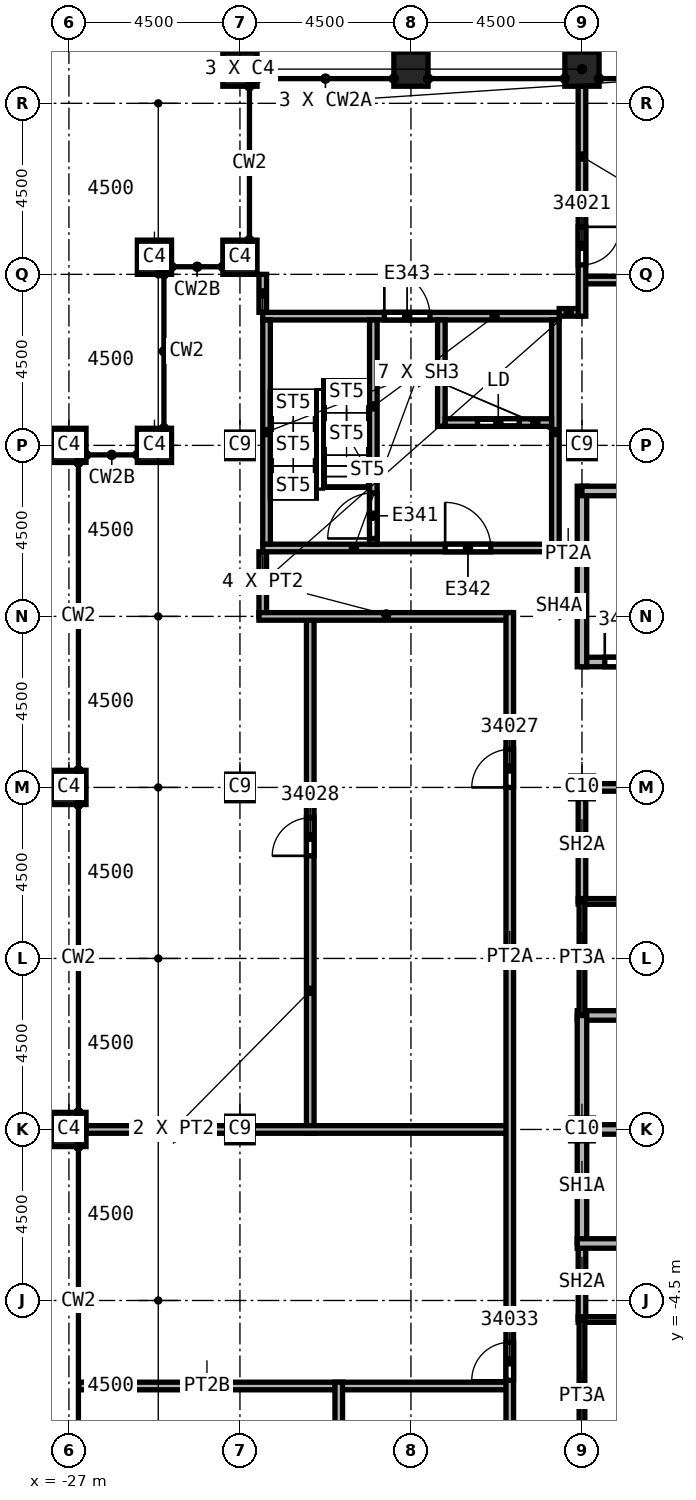
"""IFC4 building model, lengths in metres.
Left out: names, types, materials, properties, quantities, classifications, styles, units other than length and angle.
Written with IfcOpenShell. Run it as: python <this file> out.ifc"""

import sys

from ifc_helpers import new_model, si_unit, direction, frame, frame_2d, origin, origin_2d, place, context, subcontext, project, spatial, rectangle, extrude, element, fill, save


model = new_model("IFC4")
c1 = context("Model", 3, precision=1e-05, world=origin(), true_north=direction((0.0, 1.0)))
c2 = subcontext(c1, "Body", "Model", "MODEL_VIEW")
j1 = project(units=[si_unit("LENGTHUNIT", "METRE"), si_unit("PLANEANGLEUNIT", "RADIAN")], contexts=[c1])
p1 = place(None, origin())
s1 = spatial("IfcSite", under=j1, at=p1, CompositionType="ELEMENT")
p2 = place(p1, origin())
s2 = spatial("IfcBuilding", under=s1, at=p2, CompositionType="ELEMENT")
p3 = place(p2, frame((0.0, 0.0, 366.0)))
s3 = spatial("IfcBuildingStorey", under=s2, at=p3, CompositionType="ELEMENT", Elevation=366.0)
for number, where, z_axis, x_axis in (
    (1, (-13.5, 18.0, 0.0), (0.0, 0.0, 1.0), (1.0, 0.0, 0.0)),
    (2, (-22.5, 0.0, 0.0), (0.0, 0.0, 1.0), (1.0, 0.0, 0.0)),
    (3, (-22.5, 9.0, 0.0), (0.0, 0.0, 1.0), (1.0, 0.0, 0.0)),
    (4, (-22.5, 18.0, 0.0), (0.0, 0.0, 1.0), (1.0, 0.0, 0.0)),
):
    element("IfcColumn", number, at=place(p3, frame(where, z_axis=z_axis, x_axis=x_axis)), inside=s3, PredefinedType="COLUMN", context=c2, shape_type="SweptSolid", body=[
        extrude(rectangle(XDim=0.7, YDim=0.7, at=origin_2d()), origin(), (0.0, 0.0, 1.0), 9.6),
    ])
for number, where, z_axis, x_axis in (
    (5, (-13.5, 0.0, 0.0), (0.0, 0.0, 1.0), (1.0, 0.0, 0.0)),
    (6, (-13.5, 9.0, 0.0), (0.0, 0.0, 1.0), (1.0, 0.0, 0.0)),
):
    element("IfcColumn", number, at=place(p3, frame(where, z_axis=z_axis, x_axis=x_axis)), inside=s3, PredefinedType="COLUMN", context=c2, shape_type="SweptSolid", body=[
        extrude(rectangle(XDim=0.6, YDim=0.6, at=origin_2d()), origin(), (0.0, 0.0, 1.0), 9.6),
    ])
for number, where, z_axis, x_axis in (
    (7, (-13.5, 27.9, 0.0), (0.0, 0.0, 1.0), (1.0, 0.0, 0.0)),
    (8, (-18.0, 27.9, 0.0), (0.0, 0.0, 1.0), (1.0, 0.0, 0.0)),
    (9, (-22.5, 27.9, 0.0), (0.0, 0.0, 1.0), (1.0, 0.0, 0.0)),
    (10, (-27.0, 0.0, 0.0), (0.0, 0.0, 1.0), (0.0, 1.0, 0.0)),
    (11, (-27.0, 9.0, 0.0), (0.0, 0.0, 1.0), (0.0, 1.0, 0.0)),
    (12, (-27.0, 18.0, 0.0), (0.0, 0.0, 1.0), (0.0, 1.0, 0.0)),
    (13, (-22.5, 22.95, 0.0), (0.0, 0.0, 1.0), (1.0, 0.0, 0.0)),
    (14, (-24.75, 22.95, 0.0), (0.0, 0.0, 1.0), (1.0, 0.0, 0.0)),
    (15, (-24.75, 18.0, 0.0), (0.0, 0.0, 1.0), (1.0, 0.0, 0.0)),
):
    element("IfcColumn", number, at=place(p3, frame(where, z_axis=z_axis, x_axis=x_axis)), inside=s3, PredefinedType="COLUMN", context=c2, shape_type="SweptSolid", body=[
        extrude(rectangle(XDim=0.9, YDim=0.9, at=origin_2d()), origin(), (0.0, 0.0, 1.0), 9.6),
    ])
p4 = place(p3, frame((-26.736, -6.75, 0.0), z_axis=(0.0, 0.0, 1.0), x_axis=(1.0, 0.0, 0.0)))
e16 = element("IfcWall", 16, at=p4, inside=s3, PredefinedType="PARTITIONING", context=c2, shape_type="SweptSolid", body=[
    extrude(rectangle(XDim=11.336, YDim=0.2, at=frame_2d((5.668, 0.0))), origin(), (0.0, 0.0, 1.0), 9.115),
])
p5 = place(p3, frame((-21.9, 13.5, 0.0), z_axis=(0.0, 0.0, 1.0), x_axis=(0.0, 1.0, 0.0)))
e17 = element("IfcWall", 17, at=p5, inside=s3, PredefinedType="PARTITIONING", context=c2, shape_type="SweptSolid", body=[
    extrude(rectangle(XDim=1.7, YDim=0.2, at=frame_2d((0.85, 0.0))), origin(), (0.0, 0.0, 1.0), 9.15),
])
p6 = place(p3, frame((-21.9, 21.5, 0.0), z_axis=(0.0, 0.0, 1.0), x_axis=(0.0, 1.0, 0.0)))
e18 = element("IfcWall", 18, at=p6, inside=s3, PredefinedType="PARTITIONING", context=c2, shape_type="SweptSolid", body=[
    extrude(rectangle(XDim=1.0, YDim=0.2, at=frame_2d((0.5, 0.0))), origin(), (0.0, 0.0, 1.0), 9.15),
])
p7 = place(p3, frame((-20.65, -0.1, 0.0), z_axis=(0.0, 0.0, 1.0), x_axis=(0.0, 1.0, 0.0)))
e19 = element("IfcWall", 19, at=p7, inside=s3, PredefinedType="PARTITIONING", context=c2, shape_type="SweptSolid", body=[
    extrude(rectangle(XDim=13.6, YDim=0.2, at=frame_2d((6.8, 0.0))), origin(), (0.0, 0.0, 1.0), 9.15),
])
p8 = place(p7, frame((7.3, 0.0, 0.0)))
e20 = element("IfcOpeningElement", 20, at=p8, cuts=e19, PredefinedType="OPENING", context=c2, shape_type="SweptSolid", body=[
    extrude(rectangle(XDim=1.0, YDim=2.1, at=frame_2d((0.5, 1.05))), frame((0.0, 0.1, 0.0), z_axis=(0.0, -1.0, 0.0), x_axis=(1.0, 0.0, 0.0)), (0.0, 0.0, 1.0), 0.2),
])
p9 = place(p3, frame((-15.4, 0.0, 0.0), z_axis=(0.0, 0.0, 1.0), x_axis=(-1.0, 0.0, 0.0)))
e21 = element("IfcWall", 21, at=p9, inside=s3, PredefinedType="PARTITIONING", context=c2, shape_type="SweptSolid", body=[
    extrude(rectangle(XDim=11.15, YDim=0.2, at=frame_2d((5.575, 0.0))), origin(), (0.0, 0.0, 1.0), 9.15),
])
p10 = place(p3, frame((-15.4, 13.5, 0.0), z_axis=(0.0, 0.0, 1.0), x_axis=(-1.0, 0.0, 0.0)))
e22 = element("IfcWall", 22, at=p10, inside=s3, PredefinedType="PARTITIONING", context=c2, shape_type="SweptSolid", body=[
    extrude(rectangle(XDim=6.6, YDim=0.2, at=frame_2d((3.3, 0.0))), origin(), (0.0, 0.0, 1.0), 9.15),
])
p11 = place(p3, frame((-19.9, -20.25, 0.0), z_axis=(0.0, 0.0, 1.0), x_axis=(0.0, 1.0, 0.0)))
e23 = element("IfcWall", 23, at=p11, inside=s3, PredefinedType="PARTITIONING", context=c2, shape_type="SweptSolid", body=[
    extrude(rectangle(XDim=13.6, YDim=0.2, at=frame_2d((6.8, 0.0))), origin(), (0.0, 0.0, 1.0), 9.115),
])
p12 = place(p11, frame((7.9, 0.0, 0.0)))
e24 = element("IfcOpeningElement", 24, at=p12, cuts=e23, PredefinedType="OPENING", context=c2, shape_type="SweptSolid", body=[
    extrude(rectangle(XDim=1.0, YDim=2.1, at=frame_2d((0.5, 1.05))), frame((0.0, 0.1, 0.0), z_axis=(0.0, -1.0, 0.0), x_axis=(1.0, 0.0, 0.0)), (0.0, 0.0, 1.0), 0.2),
])
p13 = place(p3, frame((-15.4, -27.45, 0.0), z_axis=(0.0, 0.0, 1.0), x_axis=(0.0, 1.0, 0.0)))
e25 = element("IfcWall", 25, at=p13, inside=s3, PredefinedType="PARTITIONING", context=c2, shape_type="SweptSolid", body=[
    extrude(rectangle(XDim=41.05, YDim=0.2, at=frame_2d((20.525, 0.0))), origin(), (0.0, 0.0, 1.0), 5.76),
])
p14 = place(p13, frame((36.45, 0.0, 0.0)))
e26 = element("IfcOpeningElement", 26, at=p14, cuts=e25, PredefinedType="OPENING", context=c2, shape_type="SweptSolid", body=[
    extrude(rectangle(XDim=1.0, YDim=2.1, at=frame_2d((0.5, 1.05))), frame((0.0, 0.1, 0.0), z_axis=(0.0, -1.0, 0.0), x_axis=(1.0, 0.0, 0.0)), (0.0, 0.0, 1.0), 0.2),
])
p15 = place(p13, frame((4.0, 0.0, 0.0)))
e27 = element("IfcOpeningElement", 27, at=p15, cuts=e25, PredefinedType="OPENING", context=c2, shape_type="SweptSolid", body=[
    extrude(rectangle(XDim=1.0, YDim=2.1, at=frame_2d((0.5, 1.05))), frame((0.0, 0.1, 0.0), z_axis=(0.0, -1.0, 0.0), x_axis=(1.0, 0.0, 0.0)), (0.0, 0.0, 1.0), 0.2),
])
p16 = place(p13, frame((10.05, 0.0, 0.0)))
e28 = element("IfcOpeningElement", 28, at=p16, cuts=e25, PredefinedType="OPENING", context=c2, shape_type="SweptSolid", body=[
    extrude(rectangle(XDim=1.0, YDim=2.1, at=frame_2d((0.5, 1.05))), frame((0.0, 0.1, 0.0), z_axis=(0.0, -1.0, 0.0), x_axis=(1.0, 0.0, 0.0)), (0.0, 0.0, 1.0), 0.2),
])
p17 = place(p13, frame((15.9, 0.0, 0.0)))
e29 = element("IfcOpeningElement", 29, at=p17, cuts=e25, PredefinedType="OPENING", context=c2, shape_type="SweptSolid", body=[
    extrude(rectangle(XDim=1.0, YDim=2.1, at=frame_2d((0.5, 1.05))), frame((0.0, 0.1, 0.0), z_axis=(0.0, -1.0, 0.0), x_axis=(1.0, 0.0, 0.0)), (0.0, 0.0, 1.0), 0.2),
])
p18 = place(p13, frame((20.85, 0.0, 0.0)))
e30 = element("IfcOpeningElement", 30, at=p18, cuts=e25, PredefinedType="OPENING", context=c2, shape_type="SweptSolid", body=[
    extrude(rectangle(XDim=1.0, YDim=2.1, at=frame_2d((0.5, 1.05))), frame((0.0, 0.1, 0.0), z_axis=(0.0, -1.0, 0.0), x_axis=(1.0, 0.0, 0.0)), (0.0, 0.0, 1.0), 0.2),
])
p19 = place(p3, frame((-14.1, 15.2, 0.0), z_axis=(0.0, 0.0, 1.0), x_axis=(1.0, 0.0, 0.0)))
e31 = element("IfcWall", 31, at=p19, inside=s3, PredefinedType="PARTITIONING", context=c2, shape_type="SweptSolid", body=[
    extrude(rectangle(XDim=0.725, YDim=0.2, at=frame_2d((0.363, 0.0))), origin(), (0.0, 0.0, 1.0), 5.76),
])
p20 = place(p3, frame((-13.5, 21.5, 0.0), z_axis=(0.0, 0.0, 1.0), x_axis=(-1.0, 0.0, 0.0)))
e32 = element("IfcWall", 32, at=p20, inside=s3, PredefinedType="PARTITIONING", context=c2, shape_type="SweptSolid", body=[
    extrude(rectangle(XDim=0.6, YDim=0.2, at=frame_2d((0.3, 0.0))), origin(), (0.0, 0.0, 1.0), 9.15),
])
p21 = place(p3, frame((-13.5, 22.35, 0.0), z_axis=(0.0, 0.0, 1.0), x_axis=(1.0, 0.0, 0.0)))
e33 = element("IfcWall", 33, at=p21, inside=s3, PredefinedType="PARTITIONING", context=c2, shape_type="SweptSolid", body=[
    extrude(rectangle(XDim=10.6, YDim=0.2, at=frame_2d((5.3, 0.0))), origin(), (0.0, 0.0, 1.0), 9.15),
])
p22 = place(p3, frame((-13.5, 27.45, 0.0), z_axis=(0.0, 0.0, 1.0), x_axis=(0.0, -1.0, 0.0)))
e34 = element("IfcWall", 34, at=p22, inside=s3, PredefinedType="PARTITIONING", context=c2, shape_type="SweptSolid", body=[
    extrude(rectangle(XDim=6.05, YDim=0.2, at=frame_2d((3.025, 0.0))), origin(), (0.0, 0.0, 1.0), 9.15),
])
p23 = place(p22, frame((3.7, 0.0, 0.0)))
e35 = element("IfcOpeningElement", 35, at=p23, cuts=e34, PredefinedType="OPENING", context=c2, shape_type="SweptSolid", body=[
    extrude(rectangle(XDim=1.0, YDim=2.1, at=frame_2d((0.5, 1.05))), frame((0.0, 0.1, 0.0), z_axis=(0.0, -1.0, 0.0), x_axis=(1.0, 0.0, 0.0)), (0.0, 0.0, 1.0), 0.2),
])
p24 = place(p3, frame((-13.5, -5.0, 0.0), z_axis=(0.0, 0.0, 1.0), x_axis=(0.0, 1.0, 0.0)))
e36 = element("IfcWall", 36, at=p24, inside=s3, PredefinedType="SOLIDWALL", context=c2, shape_type="SweptSolid", body=[
    extrude(rectangle(XDim=2.0, YDim=0.2, at=frame_2d((1.0, 0.0))), origin(), (0.0, 0.0, 1.0), 5.76),
])
p25 = place(p3, frame((-13.5, 6.0, 0.0), z_axis=(0.0, 0.0, 1.0), x_axis=(0.0, 1.0, 0.0)))
e37 = element("IfcWall", 37, at=p25, inside=s3, PredefinedType="SOLIDWALL", context=c2, shape_type="SweptSolid", body=[
    extrude(rectangle(XDim=3.1, YDim=0.2, at=frame_2d((1.55, 0.0))), origin(), (0.0, 0.0, 1.0), 5.76),
])
p26 = place(p3, frame((-13.5, 9.0, 0.0), z_axis=(0.0, 0.0, 1.0), x_axis=(1.0, 0.0, 0.0)))
e38 = element("IfcWall", 38, at=p26, inside=s3, PredefinedType="SOLIDWALL", context=c2, shape_type="SweptSolid", body=[
    extrude(rectangle(XDim=3.0, YDim=0.2, at=frame_2d((1.5, 0.0))), origin(), (0.0, 0.0, 1.0), 8.838),
])
p27 = place(p3, frame((-13.625, 0.0, 0.0), z_axis=(0.0, 0.0, 1.0), x_axis=(1.0, 0.0, 0.0)))
e39 = element("IfcWall", 39, at=p27, inside=s3, PredefinedType="SOLIDWALL", context=c2, shape_type="SweptSolid", body=[
    extrude(rectangle(XDim=3.125, YDim=0.25, at=frame_2d((1.562, 0.0))), origin(), (0.0, 0.0, 1.0), 9.15),
])
p28 = place(p3, frame((-13.625, 3.0, 0.0), z_axis=(0.0, 0.0, 1.0), x_axis=(1.0, 0.0, 0.0)))
e40 = element("IfcWall", 40, at=p28, inside=s3, PredefinedType="SOLIDWALL", context=c2, shape_type="SweptSolid", body=[
    extrude(rectangle(XDim=6.125, YDim=0.25, at=frame_2d((3.062, 0.0))), origin(), (0.0, 0.0, 1.0), 9.15),
])
p29 = place(p28, frame((4.75, 0.0, 0.0)))
e41 = element("IfcOpeningElement", 41, at=p29, cuts=e40, PredefinedType="OPENING", context=c2, shape_type="SweptSolid", body=[
    extrude(rectangle(XDim=1.1, YDim=2.1, at=frame_2d((0.55, 1.05))), frame((0.0, 0.125, 0.0), z_axis=(0.0, -1.0, 0.0), x_axis=(1.0, 0.0, 0.0)), (0.0, 0.0, 1.0), 0.25),
])
p30 = place(p3, frame((-13.5, -3.0, 0.0), z_axis=(0.0, 0.0, 1.0), x_axis=(0.0, 1.0, 0.0)))
e42 = element("IfcWall", 42, at=p30, inside=s3, PredefinedType="SOLIDWALL", context=c2, shape_type="SweptSolid", body=[
    extrude(rectangle(XDim=6.0, YDim=0.25, at=frame_2d((3.0, 0.0))), origin(), (0.0, 0.0, 1.0), 5.76),
])
p31 = place(p3, frame((-13.625, -3.0, 0.0), z_axis=(0.0, 0.0, 1.0), x_axis=(1.0, 0.0, 0.0)))
e43 = element("IfcWall", 43, at=p31, inside=s3, PredefinedType="SOLIDWALL", context=c2, shape_type="SweptSolid", body=[
    extrude(rectangle(XDim=6.125, YDim=0.25, at=frame_2d((3.062, 0.0))), origin(), (0.0, 0.0, 1.0), 9.15),
])
p32 = place(p31, frame((4.75, 0.0, 0.0)))
e44 = element("IfcOpeningElement", 44, at=p32, cuts=e43, PredefinedType="OPENING", context=c2, shape_type="SweptSolid", body=[
    extrude(rectangle(XDim=1.1, YDim=2.1, at=frame_2d((0.55, 1.05))), frame((0.0, 0.125, 0.0), z_axis=(0.0, -1.0, 0.0), x_axis=(1.0, 0.0, 0.0)), (0.0, 0.0, 1.0), 0.25),
])
p33 = place(p3, frame((-13.5, 12.3, 0.0), z_axis=(0.0, 0.0, 1.0), x_axis=(1.0, 0.0, 0.0)))
e45 = element("IfcWall", 45, at=p33, inside=s3, PredefinedType="SOLIDWALL", context=c2, shape_type="SweptSolid", body=[
    extrude(rectangle(XDim=9.125, YDim=0.25, at=frame_2d((4.562, 0.0))), origin(), (0.0, 0.0, 1.0), 9.15),
])
p34 = place(p33, frame((0.6, 0.0, 0.0)))
e46 = element("IfcOpeningElement", 46, at=p34, cuts=e45, PredefinedType="OPENING", context=c2, shape_type="SweptSolid", body=[
    extrude(rectangle(XDim=1.2, YDim=2.1, at=frame_2d((0.6, 1.05))), frame((0.0, 0.125, 0.0), z_axis=(0.0, -1.0, 0.0), x_axis=(1.0, 0.0, 0.0)), (0.0, 0.0, 1.0), 0.25),
])
p35 = place(p3, frame((-13.5, 12.175, 0.0), z_axis=(0.0, 0.0, 1.0), x_axis=(0.0, 1.0, 0.0)))
e47 = element("IfcWall", 47, at=p35, inside=s3, PredefinedType="SOLIDWALL", context=c2, shape_type="SweptSolid", body=[
    extrude(rectangle(XDim=4.75, YDim=0.25, at=frame_2d((2.375, 0.0))), origin(), (0.0, 0.0, 1.0), 5.76),
])
p36 = place(p3, frame((-13.5, 16.8, 0.0), z_axis=(0.0, 0.0, 1.0), x_axis=(1.0, 0.0, 0.0)))
e48 = element("IfcWall", 48, at=p36, inside=s3, PredefinedType="SOLIDWALL", context=c2, shape_type="SweptSolid", body=[
    extrude(rectangle(XDim=9.1, YDim=0.25, at=frame_2d((4.55, 0.0))), origin(), (0.0, 0.0, 1.0), 9.15),
])
for number, where, z_axis, x_axis in (
    (49, (-13.6, -5.0, 0.0), (0.0, 0.0, 1.0), (1.0, 0.0, 0.0)),
    (50, (-13.6, 6.0, 0.0), (0.0, 0.0, 1.0), (1.0, 0.0, 0.0)),
):
    element("IfcWall", number, at=place(p3, frame(where, z_axis=z_axis, x_axis=x_axis)), inside=s3, PredefinedType="PARTITIONING", context=c2, shape_type="SweptSolid", body=[
        extrude(rectangle(XDim=3.1, YDim=0.15, at=frame_2d((1.55, 0.0))), origin(), (0.0, 0.0, 1.0), 9.15),
    ])
p37 = place(p3, frame((-13.5, -9.075, 0.0), z_axis=(0.0, 0.0, 1.0), x_axis=(0.0, 1.0, 0.0)))
e51 = element("IfcWall", 51, at=p37, inside=s3, PredefinedType="PARTITIONING", context=c2, shape_type="SweptSolid", body=[
    extrude(rectangle(XDim=4.075, YDim=0.15, at=frame_2d((2.038, 0.0))), origin(), (0.0, 0.0, 1.0), 5.76),
])
p38 = place(p3, frame((-13.5, 3.0, 0.0), z_axis=(0.0, 0.0, 1.0), x_axis=(0.0, 1.0, 0.0)))
e52 = element("IfcWall", 52, at=p38, inside=s3, PredefinedType="PARTITIONING", context=c2, shape_type="SweptSolid", body=[
    extrude(rectangle(XDim=3.0, YDim=0.15, at=frame_2d((1.5, 0.0))), origin(), (0.0, 0.0, 1.0), 5.76),
])
p39 = place(p3, frame((-21.9, 15.3, 0.0), z_axis=(0.0, 0.0, 1.0), x_axis=(1.0, 0.0, 0.0)))
e53 = element("IfcWall", 53, at=p39, inside=s3, PredefinedType="SOLIDWALL", context=c2, shape_type="SweptSolid", body=[
    extrude(rectangle(XDim=8.275, YDim=0.2, at=frame_2d((4.137, 0.0))), origin(), (0.0, 0.0, 1.0), 9.15),
])
p40 = place(p39, frame((4.8, 0.0, 0.0)))
e54 = element("IfcOpeningElement", 54, at=p40, cuts=e53, PredefinedType="OPENING", context=c2, shape_type="SweptSolid", body=[
    extrude(rectangle(XDim=1.2, YDim=2.1, at=frame_2d((0.6, 1.05))), frame((0.0, 0.1, 0.0), z_axis=(0.0, -1.0, 0.0), x_axis=(1.0, 0.0, 0.0)), (0.0, 0.0, 1.0), 0.2),
])
p41 = place(p3, frame((-21.9, 21.4, 0.0), z_axis=(0.0, 0.0, 1.0), x_axis=(1.0, 0.0, 0.0)))
e55 = element("IfcWall", 55, at=p41, inside=s3, PredefinedType="SOLIDWALL", context=c2, shape_type="SweptSolid", body=[
    extrude(rectangle(XDim=7.8, YDim=0.2, at=frame_2d((3.9, 0.0))), origin(), (0.0, 0.0, 1.0), 9.15),
])
p42 = place(p41, frame((3.2, 0.0, 0.0)))
e56 = element("IfcOpeningElement", 56, at=p42, cuts=e55, PredefinedType="OPENING", context=c2, shape_type="SweptSolid", body=[
    extrude(rectangle(XDim=1.2, YDim=2.1, at=frame_2d((0.6, 1.05))), frame((0.0, 0.1, 0.0), z_axis=(0.0, -1.0, 0.0), x_axis=(1.0, 0.0, 0.0)), (0.0, 0.0, 1.0), 0.2),
])
for number, where, z_axis, x_axis in (
    (57, (-21.8, 15.4, 0.0), (0.0, 0.0, 1.0), (0.0, 1.0, 0.0)),
    (58, (-14.2, 15.4, 0.0), (0.0, 0.0, 1.0), (0.0, 1.0, 0.0)),
):
    element("IfcWall", number, at=place(p3, frame(where, z_axis=z_axis, x_axis=x_axis)), inside=s3, PredefinedType="SOLIDWALL", context=c2, shape_type="SweptSolid", body=[
        extrude(rectangle(XDim=5.9, YDim=0.2, at=frame_2d((2.95, 0.0))), origin(), (0.0, 0.0, 1.0), 9.15),
    ])
p43 = place(p3, frame((-18.99, 15.4, 0.0), z_axis=(0.0, 0.0, 1.0), x_axis=(0.0, 1.0, 0.0)))
e59 = element("IfcWall", 59, at=p43, inside=s3, PredefinedType="SOLIDWALL", context=c2, shape_type="SweptSolid", body=[
    extrude(rectangle(XDim=5.9, YDim=0.2, at=frame_2d((2.95, 0.0))), origin(), (0.0, 0.0, 1.0), 9.15),
])
p44 = place(p43, frame((0.15, 0.0, 0.0)))
e60 = element("IfcOpeningElement", 60, at=p44, cuts=e59, PredefinedType="OPENING", context=c2, shape_type="SweptSolid", body=[
    extrude(rectangle(XDim=1.2, YDim=2.1, at=frame_2d((0.6, 1.05))), frame((0.0, 0.1, 0.0), z_axis=(0.0, -1.0, 0.0), x_axis=(1.0, 0.0, 0.0)), (0.0, 0.0, 1.0), 0.2),
])
p45 = place(p3, frame((-17.2, 18.5, 0.0), z_axis=(0.0, 0.0, 1.0), x_axis=(0.0, 1.0, 0.0)))
e61 = element("IfcWall", 61, at=p45, inside=s3, PredefinedType="SOLIDWALL", context=c2, shape_type="SweptSolid", body=[
    extrude(rectangle(XDim=2.8, YDim=0.2, at=frame_2d((1.4, 0.0))), origin(), (0.0, 0.0, 1.0), 9.15),
])
p46 = place(p3, frame((-17.1, 18.6, 0.0), z_axis=(0.0, 0.0, 1.0), x_axis=(1.0, 0.0, 0.0)))
e62 = element("IfcWall", 62, at=p46, inside=s3, PredefinedType="SOLIDWALL", context=c2, shape_type="SweptSolid", body=[
    extrude(rectangle(XDim=2.8, YDim=0.2, at=frame_2d((1.4, 0.0))), origin(), (0.0, 0.0, 1.0), 9.15),
])
p47 = place(p46, frame((0.85, 0.0, 0.0)))
e63 = element("IfcOpeningElement", 63, at=p47, cuts=e62, PredefinedType="OPENING", context=c2, shape_type="SweptSolid", body=[
    extrude(rectangle(XDim=1.1, YDim=2.1, at=frame_2d((0.55, 1.05))), frame((0.0, 0.1, 0.0), z_axis=(0.0, -1.0, 0.0), x_axis=(1.0, 0.0, 0.0)), (0.0, 0.0, 1.0), 0.2),
])
p48 = place(p34, origin())
e64 = element("IfcDoor", 64, at=p48, inside=s3, OperationType="SINGLE_SWING_RIGHT", PredefinedType="DOOR", context=c2, shape_type="SweptSolid", body=[
    extrude(rectangle(XDim=1.2, YDim=2.1, at=frame_2d((0.6, 1.05))), frame((0.0, 0.025, 0.0), z_axis=(0.0, -1.0, 0.0), x_axis=(1.0, 0.0, 0.0)), (0.0, 0.0, 1.0), 0.05),
])
fill(e46, e64)
p49 = place(p23, origin())
e65 = element("IfcDoor", 65, at=p49, inside=s3, OperationType="SINGLE_SWING_RIGHT", PredefinedType="DOOR", context=c2, shape_type="SweptSolid", body=[
    extrude(rectangle(XDim=1.0, YDim=2.1, at=frame_2d((0.5, 1.05))), frame((0.0, 0.025, 0.0), z_axis=(0.0, -1.0, 0.0), x_axis=(1.0, 0.0, 0.0)), (0.0, 0.0, 1.0), 0.05),
])
fill(e35, e65)
p50 = place(p14, origin())
e66 = element("IfcDoor", 66, at=p50, inside=s3, OperationType="SINGLE_SWING_RIGHT", PredefinedType="DOOR", context=c2, shape_type="SweptSolid", body=[
    extrude(rectangle(XDim=1.0, YDim=2.1, at=frame_2d((0.5, 1.05))), frame((0.0, 0.025, 0.0), z_axis=(0.0, -1.0, 0.0), x_axis=(1.0, 0.0, 0.0)), (0.0, 0.0, 1.0), 0.05),
])
fill(e26, e66)
p51 = place(p8, origin())
e67 = element("IfcDoor", 67, at=p51, inside=s3, OperationType="SINGLE_SWING_LEFT", PredefinedType="DOOR", context=c2, shape_type="SweptSolid", body=[
    extrude(rectangle(XDim=1.0, YDim=2.1, at=frame_2d((0.5, 1.05))), frame((0.0, 0.025, 0.0), z_axis=(0.0, -1.0, 0.0), x_axis=(1.0, 0.0, 0.0)), (0.0, 0.0, 1.0), 0.05),
])
fill(e20, e67)
p52 = place(p18, origin())
e68 = element("IfcDoor", 68, at=p52, inside=s3, OperationType="SINGLE_SWING_RIGHT", PredefinedType="DOOR", context=c2, shape_type="SweptSolid", body=[
    extrude(rectangle(XDim=1.0, YDim=2.1, at=frame_2d((0.5, 1.05))), frame((0.0, 0.025, 0.0), z_axis=(0.0, -1.0, 0.0), x_axis=(1.0, 0.0, 0.0)), (0.0, 0.0, 1.0), 0.05),
])
fill(e30, e68)
p53 = place(p44, origin())
e69 = element("IfcDoor", 69, at=p53, inside=s3, OperationType="SINGLE_SWING_LEFT", PredefinedType="DOOR", context=c2, shape_type="SweptSolid", body=[
    extrude(rectangle(XDim=1.2, YDim=2.1, at=frame_2d((0.6, 1.05))), frame((0.0, 0.025, 0.0), z_axis=(0.0, -1.0, 0.0), x_axis=(1.0, 0.0, 0.0)), (0.0, 0.0, 1.0), 0.05),
])
fill(e60, e69)
p54 = place(p47, origin())
e70 = element("IfcDoor", 70, at=p54, inside=s3, OperationType="SLIDING_TO_LEFT", PredefinedType="DOOR", context=c2, shape_type="SweptSolid", body=[
    extrude(rectangle(XDim=1.1, YDim=2.1, at=frame_2d((0.55, 1.05))), frame((0.0, 0.025, 0.0), z_axis=(0.0, -1.0, 0.0), x_axis=(1.0, 0.0, 0.0)), (0.0, 0.0, 1.0), 0.05),
])
fill(e63, e70)
p55 = place(p40, origin())
e71 = element("IfcDoor", 71, at=p55, inside=s3, OperationType="SINGLE_SWING_RIGHT", PredefinedType="DOOR", context=c2, shape_type="SweptSolid", body=[
    extrude(rectangle(XDim=1.2, YDim=2.1, at=frame_2d((0.6, 1.05))), frame((0.0, 0.025, 0.0), z_axis=(0.0, -1.0, 0.0), x_axis=(1.0, 0.0, 0.0)), (0.0, 0.0, 1.0), 0.05),
])
fill(e54, e71)
p56 = place(p42, origin())
e72 = element("IfcDoor", 72, at=p56, inside=s3, OperationType="SINGLE_SWING_LEFT", PredefinedType="DOOR", context=c2, shape_type="SweptSolid", body=[
    extrude(rectangle(XDim=1.2, YDim=2.1, at=frame_2d((0.6, 1.05))), frame((0.0, 0.025, 0.0), z_axis=(0.0, -1.0, 0.0), x_axis=(1.0, 0.0, 0.0)), (0.0, 0.0, 1.0), 0.05),
])
fill(e56, e72)
save(model, sys.argv[1])
